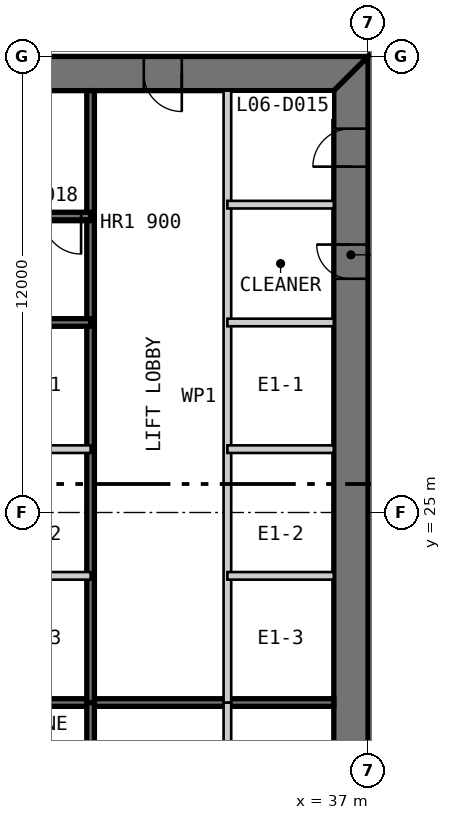
"""IFC4 building model, lengths in metres.
Left out: names, types, materials, properties, quantities, classifications, styles, units other than length and angle.
Written with IfcOpenShell. Run it as: python <this file> out.ifc"""

import sys

from ifc_helpers import new_model, si_unit, direction, frame, frame_2d, origin, place, context, subcontext, project, spatial, polyline, rectangle, outline, extrude, element, fill, save


model = new_model("IFC4")
c1 = context("Model", 3, precision=1e-05, world=origin(), true_north=direction((0.0, 1.0)))
c2 = subcontext(c1, "Body", "Model", "MODEL_VIEW")
j1 = project(units=[si_unit("LENGTHUNIT", "METRE"), si_unit("PLANEANGLEUNIT", "RADIAN")], contexts=[c1])
p1 = place(None, origin())
s1 = spatial("IfcSite", under=j1, at=p1, CompositionType="ELEMENT")
p2 = place(p1, origin())
s2 = spatial("IfcBuilding", under=s1, at=p2, CompositionType="ELEMENT")
p3 = place(p2, frame((0.0, 0.0, 31.0)))
s3 = spatial("IfcBuildingStorey", under=s2, at=p3, CompositionType="ELEMENT", Elevation=31.0)
p4 = place(p3, frame((36.55, 13.9, 0.0), z_axis=(0.0, 0.0, 1.0), x_axis=(0.0, 1.0, 0.0)))
e1 = element("IfcWall", 1, at=p4, inside=s3, PredefinedType="SHEAR", context=c2, shape_type="SweptSolid", body=[
    extrude(outline(polyline([(-0.9, -0.45), (23.1, -0.45), (22.2, 0.45), (0.0, 0.45), (-0.9, -0.45)])), origin(), (0.0, 0.0, 1.0), 4.0),
])
p5 = place(p4, frame((20.2, 0.0, 0.0)))
e2 = element("IfcOpeningElement", 2, at=p5, cuts=e1, PredefinedType="OPENING", context=c2, shape_type="SweptSolid", body=[
    extrude(rectangle(XDim=1.0, YDim=2.2, at=frame_2d((0.5, 1.1))), frame((0.0, 0.46, 0.0), z_axis=(0.0, -1.0, 0.0), x_axis=(1.0, 0.0, 0.0)), (0.0, 0.0, 1.0), 0.92),
])
p6 = place(p4, frame((17.25, 0.0, 0.0)))
e3 = element("IfcOpeningElement", 3, at=p6, cuts=e1, PredefinedType="OPENING", context=c2, shape_type="SweptSolid", body=[
    extrude(rectangle(XDim=0.9, YDim=2.2, at=frame_2d((0.45, 1.1))), frame((0.0, 0.46, 0.0), z_axis=(0.0, -1.0, 0.0), x_axis=(1.0, 0.0, 0.0)), (0.0, 0.0, 1.0), 0.92),
])
p7 = place(p3, frame((37.0, 36.55, 0.0), z_axis=(0.0, 0.0, 1.0), x_axis=(-1.0, 0.0, 0.0)))
e4 = element("IfcWall", 4, at=p7, inside=s3, PredefinedType="SHEAR", context=c2, shape_type="SweptSolid", body=[
    extrude(outline(polyline([(0.0, -0.45), (24.0, -0.45), (23.1, 0.45), (0.9, 0.45), (0.0, -0.45)])), origin(), (0.0, 0.0, 1.0), 4.0),
])
p8 = place(p7, frame((4.9, 0.0, 0.0)))
e5 = element("IfcOpeningElement", 5, at=p8, cuts=e4, PredefinedType="OPENING", context=c2, shape_type="SweptSolid", body=[
    extrude(rectangle(XDim=1.0, YDim=2.2, at=frame_2d((0.5, 1.1))), frame((0.0, 0.46, 0.0), z_axis=(0.0, -1.0, 0.0), x_axis=(1.0, 0.0, 0.0)), (0.0, 0.0, 1.0), 0.92),
])
p9 = place(p7, frame((8.9, 0.0, 0.0)))
e6 = element("IfcOpeningElement", 6, at=p9, cuts=e4, PredefinedType="OPENING", context=c2, shape_type="SweptSolid", body=[
    extrude(rectangle(XDim=1.1, YDim=2.2, at=frame_2d((0.55, 1.1))), frame((0.0, 0.46, 0.0), z_axis=(0.0, -1.0, 0.0), x_axis=(1.0, 0.0, 0.0)), (0.0, 0.0, 1.0), 0.92),
])
p10 = place(p7, frame((15.05, 0.0, 0.0)))
e7 = element("IfcOpeningElement", 7, at=p10, cuts=e4, PredefinedType="OPENING", context=c2, shape_type="SweptSolid", body=[
    extrude(rectangle(XDim=0.9, YDim=2.2, at=frame_2d((0.45, 1.1))), frame((0.0, 0.46, 0.0), z_axis=(0.0, -1.0, 0.0), x_axis=(1.0, 0.0, 0.0)), (0.0, 0.0, 1.0), 0.92),
])
p11 = place(p7, frame((17.9, 0.0, 0.0)))
e8 = element("IfcOpeningElement", 8, at=p11, cuts=e4, PredefinedType="OPENING", context=c2, shape_type="SweptSolid", body=[
    extrude(rectangle(XDim=1.0, YDim=2.2, at=frame_2d((0.5, 1.1))), frame((0.0, 0.46, 0.0), z_axis=(0.0, -1.0, 0.0), x_axis=(1.0, 0.0, 0.0)), (0.0, 0.0, 1.0), 0.92),
])
p12 = place(p7, frame((21.4, 0.0, 0.0)))
e9 = element("IfcOpeningElement", 9, at=p12, cuts=e4, PredefinedType="OPENING", context=c2, shape_type="SweptSolid", body=[
    extrude(rectangle(XDim=1.0, YDim=2.2, at=frame_2d((0.5, 1.1))), frame((0.0, 0.46, 0.0), z_axis=(0.0, -1.0, 0.0), x_axis=(1.0, 0.0, 0.0)), (0.0, 0.0, 1.0), 0.92),
])
p13 = place(p3, frame((20.3, 20.0, 0.0), z_axis=(0.0, 0.0, 1.0), x_axis=(1.0, 0.0, 0.0)))
e10 = element("IfcWall", 10, at=p13, inside=s3, PredefinedType="SOLIDWALL", context=c2, shape_type="SweptSolid", body=[
    extrude(rectangle(XDim=15.8, YDim=0.2, at=frame_2d((7.9, 0.0))), origin(), (0.0, 0.0, 1.0), 3.8),
])
p14 = place(p3, frame((29.7, 13.9, 0.0), z_axis=(0.0, 0.0, 1.0), x_axis=(0.0, 1.0, 0.0)))
e11 = element("IfcWall", 11, at=p14, inside=s3, PredefinedType="SOLIDWALL", context=c2, shape_type="SweptSolid", body=[
    extrude(rectangle(XDim=6.1, YDim=0.2, at=frame_2d((3.05, 0.0))), origin(), (0.0, 0.0, 1.0), 3.8),
])
p15 = place(p3, frame((33.3, 13.9, 0.0), z_axis=(0.0, 0.0, 1.0), x_axis=(0.0, 1.0, 0.0)))
e12 = element("IfcWall", 12, at=p15, inside=s3, PredefinedType="PARTITIONING", context=c2, shape_type="SweptSolid", body=[
    extrude(rectangle(XDim=6.1, YDim=0.2, at=frame_2d((3.05, 0.0))), origin(), (0.0, 0.0, 1.0), 3.8),
])
p16 = place(p3, frame((33.3, 36.1, 0.0), z_axis=(0.0, 0.0, 1.0), x_axis=(0.0, -1.0, 0.0)))
e13 = element("IfcWall", 13, at=p16, inside=s3, PredefinedType="PARTITIONING", context=c2, shape_type="SweptSolid", body=[
    extrude(rectangle(XDim=16.1, YDim=0.2, at=frame_2d((8.05, 0.0))), origin(), (0.0, 0.0, 1.0), 3.8),
])
p17 = place(p3, frame((29.7, 36.1, 0.0), z_axis=(0.0, 0.0, 1.0), x_axis=(0.0, -1.0, 0.0)))
e14 = element("IfcWall", 14, at=p17, inside=s3, PredefinedType="SOLIDWALL", context=c2, shape_type="SweptSolid", body=[
    extrude(rectangle(XDim=16.1, YDim=0.2, at=frame_2d((8.05, 0.0))), origin(), (0.0, 0.0, 1.0), 3.8),
])
for number, where, z_axis, x_axis in (
    (15, (36.1, 33.1, 0.0), (0.0, 0.0, 1.0), (-1.0, 0.0, 0.0)),
    (16, (36.1, 30.0, 0.0), (0.0, 0.0, 1.0), (-1.0, 0.0, 0.0)),
    (17, (36.1, 26.667, 0.0), (0.0, 0.0, 1.0), (-1.0, 0.0, 0.0)),
    (18, (36.1, 23.333, 0.0), (0.0, 0.0, 1.0), (-1.0, 0.0, 0.0)),
    (19, (29.7, 26.667, 0.0), (0.0, 0.0, 1.0), (-1.0, 0.0, 0.0)),
    (20, (29.7, 23.333, 0.0), (0.0, 0.0, 1.0), (-1.0, 0.0, 0.0)),
):
    element("IfcWall", number, at=place(p3, frame(where, z_axis=z_axis, x_axis=x_axis)), inside=s3, PredefinedType="PARTITIONING", context=c2, shape_type="SweptSolid", body=[
        extrude(rectangle(XDim=2.8, YDim=0.2, at=frame_2d((1.4, 0.0))), origin(), (0.0, 0.0, 1.0), 3.8),
    ])
p18 = place(p3, frame((29.7, 32.8, 0.0), z_axis=(0.0, 0.0, 1.0), x_axis=(-1.0, 0.0, 0.0)))
e21 = element("IfcWall", 21, at=p18, inside=s3, PredefinedType="SOLIDWALL", context=c2, shape_type="SweptSolid", body=[
    extrude(rectangle(XDim=9.4, YDim=0.2, at=frame_2d((4.7, 0.0))), origin(), (0.0, 0.0, 1.0), 3.8),
])
p19 = place(p18, frame((0.25, 0.0, 0.0)))
e22 = element("IfcOpeningElement", 22, at=p19, cuts=e21, PredefinedType="OPENING", context=c2, shape_type="SweptSolid", body=[
    extrude(rectangle(XDim=1.0, YDim=2.2, at=frame_2d((0.5, 1.1))), frame((0.0, 0.11, 0.0), z_axis=(0.0, -1.0, 0.0), x_axis=(1.0, 0.0, 0.0)), (0.0, 0.0, 1.0), 0.22),
])
p20 = place(p3, frame((29.7, 30.0, 0.0), z_axis=(0.0, 0.0, 1.0), x_axis=(-1.0, 0.0, 0.0)))
e23 = element("IfcWall", 23, at=p20, inside=s3, PredefinedType="SOLIDWALL", context=c2, shape_type="SweptSolid", body=[
    extrude(rectangle(XDim=15.8, YDim=0.2, at=frame_2d((7.9, 0.0))), origin(), (0.0, 0.0, 1.0), 3.8),
])
p21 = place(p8, origin())
e24 = element("IfcDoor", 24, at=p21, inside=s3, OperationType="SINGLE_SWING_LEFT", PredefinedType="DOOR", context=c2, shape_type="SweptSolid", body=[
    extrude(rectangle(XDim=1.0, YDim=2.2, at=frame_2d((0.5, 1.1))), frame((0.0, 0.025, 0.0), z_axis=(0.0, -1.0, 0.0), x_axis=(1.0, 0.0, 0.0)), (0.0, 0.0, 1.0), 0.05),
    extrude(outline(polyline([(0.0, 0.0), (0.04, 0.0), (0.04, 2.16), (0.96, 2.16), (0.96, 0.0), (1.0, 0.0), (1.0, 2.2), (0.0, 2.2), (0.0, 0.0)])), frame((0.0, 0.3, 0.0), z_axis=(0.0, -1.0, 0.0), x_axis=(1.0, 0.0, 0.0)), (0.0, 0.0, 1.0), 0.6),
])
fill(e5, e24)
p22 = place(p5, origin())
e25 = element("IfcDoor", 25, at=p22, inside=s3, OperationType="SINGLE_SWING_LEFT", PredefinedType="DOOR", context=c2, shape_type="SweptSolid", body=[
    extrude(rectangle(XDim=1.0, YDim=2.2, at=frame_2d((0.5, 1.1))), frame((0.0, 0.025, 0.0), z_axis=(0.0, -1.0, 0.0), x_axis=(1.0, 0.0, 0.0)), (0.0, 0.0, 1.0), 0.05),
    extrude(outline(polyline([(0.0, 0.0), (0.04, 0.0), (0.04, 2.16), (0.96, 2.16), (0.96, 0.0), (1.0, 0.0), (1.0, 2.2), (0.0, 2.2), (0.0, 0.0)])), frame((0.0, 0.3, 0.0), z_axis=(0.0, -1.0, 0.0), x_axis=(1.0, 0.0, 0.0)), (0.0, 0.0, 1.0), 0.6),
])
fill(e2, e25)
p23 = place(p6, origin())
e26 = element("IfcDoor", 26, at=p23, inside=s3, OperationType="SINGLE_SWING_RIGHT", PredefinedType="DOOR", context=c2, shape_type="SweptSolid", body=[
    extrude(rectangle(XDim=0.9, YDim=2.2, at=frame_2d((0.45, 1.1))), frame((0.0, 0.025, 0.0), z_axis=(0.0, -1.0, 0.0), x_axis=(1.0, 0.0, 0.0)), (0.0, 0.0, 1.0), 0.05),
    extrude(outline(polyline([(0.0, 0.0), (0.04, 0.0), (0.04, 2.16), (0.86, 2.16), (0.86, 0.0), (0.9, 0.0), (0.9, 2.2), (0.0, 2.2), (0.0, 0.0)])), frame((0.0, 0.3, 0.0), z_axis=(0.0, -1.0, 0.0), x_axis=(1.0, 0.0, 0.0)), (0.0, 0.0, 1.0), 0.6),
])
fill(e3, e26)
p24 = place(p19, origin())
e27 = element("IfcDoor", 27, at=p24, inside=s3, OperationType="SINGLE_SWING_LEFT", PredefinedType="DOOR", context=c2, shape_type="SweptSolid", body=[
    extrude(rectangle(XDim=1.0, YDim=2.2, at=frame_2d((0.5, 1.1))), frame((0.0, 0.025, 0.0), z_axis=(0.0, -1.0, 0.0), x_axis=(1.0, 0.0, 0.0)), (0.0, 0.0, 1.0), 0.05),
])
fill(e22, e27)
save(model, sys.argv[1])
